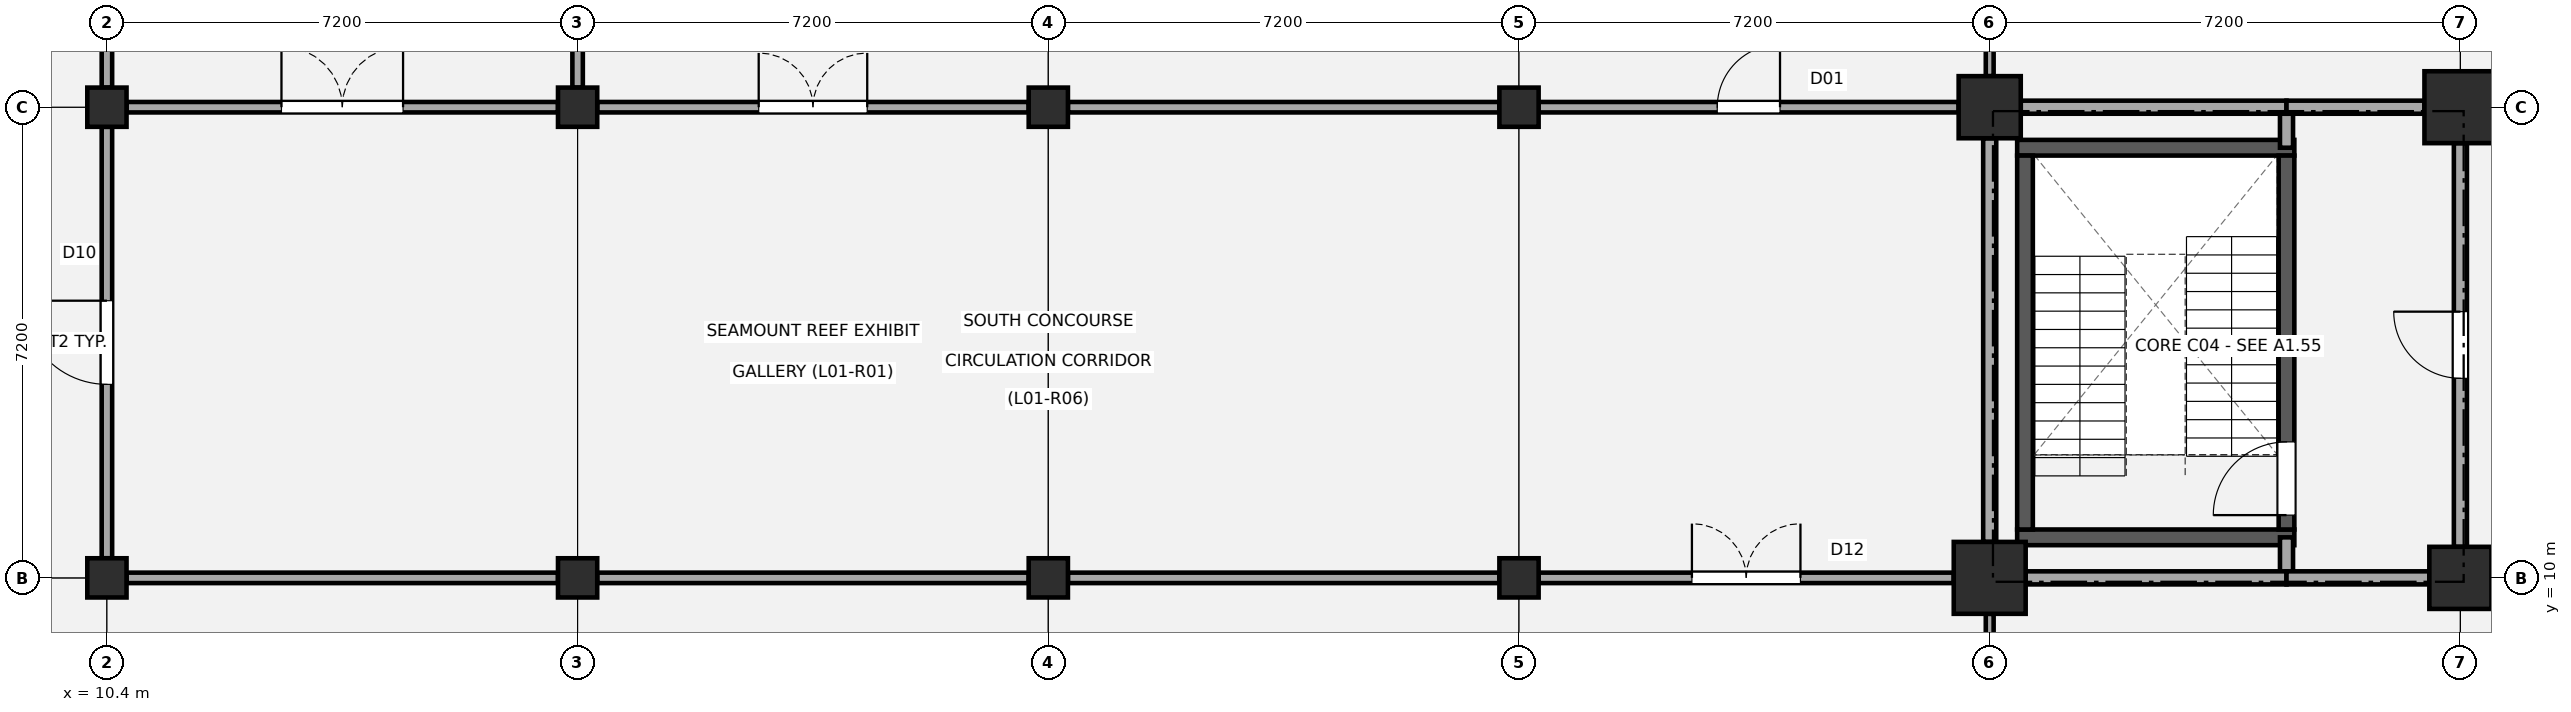
"""IFC4 building model, lengths in metres.
Left out: names, types, materials, properties, quantities, classifications, styles, units other than length and angle.
Written with IfcOpenShell. Run it as: python <this file> out.ifc"""

import sys

from ifc_helpers import new_model, si_unit, direction, frame, frame_2d, origin, origin_2d, place, context, subcontext, project, spatial, rectangle, extrude, element, fill, save


model = new_model("IFC4")
c1 = context("Model", 3, precision=1e-05, world=origin(), true_north=direction((0.0, 1.0)))
c2 = subcontext(c1, "Body", "Model", "MODEL_VIEW")
j1 = project(units=[si_unit("LENGTHUNIT", "METRE"), si_unit("PLANEANGLEUNIT", "RADIAN")], contexts=[c1])
p1 = place(None, origin())
s1 = spatial("IfcSite", under=j1, at=p1, CompositionType="ELEMENT")
p2 = place(p1, origin())
s2 = spatial("IfcBuilding", under=s1, at=p2, CompositionType="ELEMENT")
p3 = place(p2, frame((0.0, 0.0, 4.68)))
s3 = spatial("IfcBuildingStorey", under=s2, at=p3, CompositionType="ELEMENT", Elevation=4.68)
for number, where, z_axis, x_axis in (
    (1, (10.4, 10.0, 0.0), (0.0, 0.0, 1.0), (1.0, 0.0, 0.0)),
    (2, (10.4, 17.2, 0.0), (0.0, 0.0, 1.0), (1.0, 0.0, 0.0)),
    (3, (17.6, 10.0, 0.0), (0.0, 0.0, 1.0), (1.0, 0.0, 0.0)),
    (4, (17.6, 17.2, 0.0), (0.0, 0.0, 1.0), (1.0, 0.0, 0.0)),
    (5, (24.8, 10.0, 0.0), (0.0, 0.0, 1.0), (1.0, 0.0, 0.0)),
    (6, (24.8, 17.2, 0.0), (0.0, 0.0, 1.0), (1.0, 0.0, 0.0)),
    (7, (32.0, 10.0, 0.0), (0.0, 0.0, 1.0), (1.0, 0.0, 0.0)),
    (8, (32.0, 17.2, 0.0), (0.0, 0.0, 1.0), (1.0, 0.0, 0.0)),
):
    element("IfcColumn", number, at=place(p3, frame(where, z_axis=z_axis, x_axis=x_axis)), inside=s3, PredefinedType="COLUMN", context=c2, shape_type="SweptSolid", body=[
        extrude(rectangle(XDim=0.6, YDim=0.6, at=origin_2d()), origin(), (0.0, 0.0, 1.0), 4.5),
    ])
p4 = place(p3, frame((39.2, 10.0, 0.0), z_axis=(0.0, 0.0, 1.0), x_axis=(1.0, 0.0, 0.0)))
e9 = element("IfcColumn", 9, at=p4, inside=s3, PredefinedType="COLUMN", context=c2, shape_type="SweptSolid", body=[
    extrude(rectangle(XDim=1.1, YDim=1.1, at=origin_2d()), origin(), (0.0, 0.0, 1.0), 4.5),
])
for number, where, z_axis, x_axis in (
    (10, (39.2, 17.2, 0.0), (0.0, 0.0, 1.0), (1.0, 0.0, 0.0)),
    (11, (46.4, 10.0, 0.0), (0.0, 0.0, 1.0), (1.0, 0.0, 0.0)),
):
    element("IfcColumn", number, at=place(p3, frame(where, z_axis=z_axis, x_axis=x_axis)), inside=s3, PredefinedType="COLUMN", context=c2, shape_type="SweptSolid", body=[
        extrude(rectangle(XDim=0.95, YDim=0.95, at=origin_2d()), origin(), (0.0, 0.0, 1.0), 4.5),
    ])
p5 = place(p3, frame((46.4, 17.2, 0.0), z_axis=(0.0, 0.0, 1.0), x_axis=(1.0, 0.0, 0.0)))
e12 = element("IfcColumn", 12, at=p5, inside=s3, PredefinedType="COLUMN", context=c2, shape_type="SweptSolid", body=[
    extrude(rectangle(XDim=1.1, YDim=1.1, at=origin_2d()), origin(), (0.0, 0.0, 1.0), 4.5),
])
for number, where, z_axis, x_axis in (
    (13, (39.62, 10.62, 0.0), (0.0, 0.0, 1.0), (1.0, 0.0, 0.0)),
    (14, (39.62, 16.58, 0.0), (0.0, 0.0, 1.0), (1.0, 0.0, 0.0)),
):
    element("IfcWall", number, at=place(p3, frame(where, z_axis=z_axis, x_axis=x_axis)), inside=s3, PredefinedType="SHEAR", context=c2, shape_type="SweptSolid", body=[
        extrude(rectangle(XDim=4.24, YDim=0.24, at=frame_2d((2.12, 0.0))), origin(), (0.0, 0.0, 1.0), 4.2),
    ])
p6 = place(p3, frame((39.74, 10.74, 0.0), z_axis=(0.0, 0.0, 1.0), x_axis=(0.0, 1.0, 0.0)))
e15 = element("IfcWall", 15, at=p6, inside=s3, PredefinedType="SHEAR", context=c2, shape_type="SweptSolid", body=[
    extrude(rectangle(XDim=5.72, YDim=0.24, at=frame_2d((2.86, 0.0))), origin(), (0.0, 0.0, 1.0), 4.2),
])
p7 = place(p3, frame((43.74, 10.74, 0.0), z_axis=(0.0, 0.0, 1.0), x_axis=(0.0, 1.0, 0.0)))
e16 = element("IfcWall", 16, at=p7, inside=s3, PredefinedType="SHEAR", context=c2, shape_type="SweptSolid", body=[
    extrude(rectangle(XDim=5.72, YDim=0.24, at=frame_2d((2.86, 0.0))), origin(), (0.0, 0.0, 1.0), 4.2),
])
p8 = place(p7, frame((0.22, 0.0, 0.0)))
e17 = element("IfcOpeningElement", 17, at=p8, cuts=e16, PredefinedType="OPENING", context=c2, shape_type="SweptSolid", body=[
    extrude(rectangle(XDim=1.12, YDim=2.15, at=frame_2d((0.56, 1.075))), frame((0.0, 0.13, 0.0), z_axis=(0.0, -1.0, 0.0), x_axis=(1.0, 0.0, 0.0)), (0.0, 0.0, 1.0), 0.26),
])
p9 = place(p3, frame((43.74, 10.0, 0.0), z_axis=(0.0, 0.0, 1.0), x_axis=(0.0, 1.0, 0.0)))
e18 = element("IfcWall", 18, at=p9, inside=s3, PredefinedType="PARTITIONING", context=c2, shape_type="SweptSolid", body=[
    extrude(rectangle(XDim=0.62, YDim=0.2, at=frame_2d((0.31, 0.0))), origin(), (0.0, 0.0, 1.0), 3.54),
])
p10 = place(p3, frame((43.74, 16.58, 0.0), z_axis=(0.0, 0.0, 1.0), x_axis=(0.0, 1.0, 0.0)))
e19 = element("IfcWall", 19, at=p10, inside=s3, PredefinedType="PARTITIONING", context=c2, shape_type="SweptSolid", body=[
    extrude(rectangle(XDim=0.62, YDim=0.2, at=frame_2d((0.31, 0.0))), origin(), (0.0, 0.0, 1.0), 3.59),
])
p11 = place(p3, frame((39.2, 10.55, 0.0), z_axis=(0.0, 0.0, 1.0), x_axis=(0.0, 1.0, 0.0)))
e20 = element("IfcWall", 20, at=p11, inside=s3, PredefinedType="PARTITIONING", context=c2, shape_type="SweptSolid", body=[
    extrude(rectangle(XDim=6.175, YDim=0.2, at=frame_2d((3.087, 0.0))), origin(), (0.0, 0.0, 1.0), 3.59),
])
p12 = place(p3, frame((46.4, 10.475, 0.0), z_axis=(0.0, 0.0, 1.0), x_axis=(0.0, 1.0, 0.0)))
e21 = element("IfcWall", 21, at=p12, inside=s3, PredefinedType="PARTITIONING", context=c2, shape_type="SweptSolid", body=[
    extrude(rectangle(XDim=6.175, YDim=0.2, at=frame_2d((3.087, 0.0))), origin(), (0.0, 0.0, 1.0), 3.59),
])
p13 = place(p12, frame((2.577, 0.0, 0.0)))
e22 = element("IfcOpeningElement", 22, at=p13, cuts=e21, PredefinedType="OPENING", context=c2, shape_type="SweptSolid", body=[
    extrude(rectangle(XDim=1.02, YDim=2.15, at=frame_2d((0.51, 1.075))), frame((0.0, 0.11, 0.0), z_axis=(0.0, -1.0, 0.0), x_axis=(1.0, 0.0, 0.0)), (0.0, 0.0, 1.0), 0.22),
])
p14 = place(p3, frame((39.75, 10.0, 0.0), z_axis=(0.0, 0.0, 1.0), x_axis=(1.0, 0.0, 0.0)))
e23 = element("IfcWall", 23, at=p14, inside=s3, PredefinedType="PARTITIONING", context=c2, shape_type="SweptSolid", body=[
    extrude(rectangle(XDim=3.99, YDim=0.2, at=frame_2d((1.995, 0.0))), origin(), (0.0, 0.0, 1.0), 3.54),
])
p15 = place(p3, frame((43.74, 10.0, 0.0), z_axis=(0.0, 0.0, 1.0), x_axis=(1.0, 0.0, 0.0)))
e24 = element("IfcWall", 24, at=p15, inside=s3, PredefinedType="PARTITIONING", context=c2, shape_type="SweptSolid", body=[
    extrude(rectangle(XDim=2.185, YDim=0.2, at=frame_2d((1.093, 0.0))), origin(), (0.0, 0.0, 1.0), 3.54),
])
p16 = place(p3, frame((39.675, 17.2, 0.0), z_axis=(0.0, 0.0, 1.0), x_axis=(1.0, 0.0, 0.0)))
e25 = element("IfcWall", 25, at=p16, inside=s3, PredefinedType="PARTITIONING", context=c2, shape_type="SweptSolid", body=[
    extrude(rectangle(XDim=4.065, YDim=0.2, at=frame_2d((2.032, 0.0))), origin(), (0.0, 0.0, 1.0), 3.59),
])
p17 = place(p3, frame((43.74, 17.2, 0.0), z_axis=(0.0, 0.0, 1.0), x_axis=(1.0, 0.0, 0.0)))
e26 = element("IfcWall", 26, at=p17, inside=s3, PredefinedType="PARTITIONING", context=c2, shape_type="SweptSolid", body=[
    extrude(rectangle(XDim=2.11, YDim=0.2, at=frame_2d((1.055, 0.0))), origin(), (0.0, 0.0, 1.0), 3.59),
])
p18 = place(p3, frame((10.4, 10.3, 0.0), z_axis=(0.0, 0.0, 1.0), x_axis=(0.0, 1.0, 0.0)))
e27 = element("IfcWall", 27, at=p18, inside=s3, PredefinedType="PARTITIONING", context=c2, shape_type="SweptSolid", body=[
    extrude(rectangle(XDim=6.6, YDim=0.16, at=frame_2d((3.3, 0.0))), origin(), (0.0, 0.0, 1.0), 3.65),
])
p19 = place(p18, frame((2.66, 0.0, 0.0)))
e28 = element("IfcOpeningElement", 28, at=p19, cuts=e27, PredefinedType="OPENING", context=c2, shape_type="SweptSolid", body=[
    extrude(rectangle(XDim=1.28, YDim=2.2, at=frame_2d((0.64, 1.1))), frame((0.0, 0.09, 0.0), z_axis=(0.0, -1.0, 0.0), x_axis=(1.0, 0.0, 0.0)), (0.0, 0.0, 1.0), 0.18),
])
p20 = place(p3, frame((10.4, 17.5, 0.0), z_axis=(0.0, 0.0, 1.0), x_axis=(0.0, 1.0, 0.0)))
e29 = element("IfcWall", 29, at=p20, inside=s3, PredefinedType="PARTITIONING", context=c2, shape_type="SweptSolid", body=[
    extrude(rectangle(XDim=6.35, YDim=0.16, at=frame_2d((3.175, 0.0))), origin(), (0.0, 0.0, 1.0), 3.6),
])
p21 = place(p20, frame((2.245, 0.0, 0.0)))
e30 = element("IfcOpeningElement", 30, at=p21, cuts=e29, PredefinedType="OPENING", context=c2, shape_type="SweptSolid", body=[
    extrude(rectangle(XDim=1.86, YDim=2.26, at=frame_2d((0.93, 1.13))), frame((0.0, 0.09, 0.0), z_axis=(0.0, -1.0, 0.0), x_axis=(1.0, 0.0, 0.0)), (0.0, 0.0, 1.0), 0.18),
])
p22 = place(p3, frame((10.7, 10.0, 0.0), z_axis=(0.0, 0.0, 1.0), x_axis=(1.0, 0.0, 0.0)))
e31 = element("IfcWall", 31, at=p22, inside=s3, PredefinedType="PARTITIONING", context=c2, shape_type="SweptSolid", body=[
    extrude(rectangle(XDim=6.6, YDim=0.16, at=frame_2d((3.3, 0.0))), origin(), (0.0, 0.0, 1.0), 3.6),
])
p23 = place(p3, frame((10.7, 17.2, 0.0), z_axis=(0.0, 0.0, 1.0), x_axis=(1.0, 0.0, 0.0)))
e32 = element("IfcWall", 32, at=p23, inside=s3, PredefinedType="PARTITIONING", context=c2, shape_type="SweptSolid", body=[
    extrude(rectangle(XDim=6.6, YDim=0.16, at=frame_2d((3.3, 0.0))), origin(), (0.0, 0.0, 1.0), 3.65),
])
p24 = place(p23, frame((2.37, 0.0, 0.0)))
e33 = element("IfcOpeningElement", 33, at=p24, cuts=e32, PredefinedType="OPENING", context=c2, shape_type="SweptSolid", body=[
    extrude(rectangle(XDim=1.86, YDim=2.26, at=frame_2d((0.93, 1.13))), frame((0.0, 0.09, 0.0), z_axis=(0.0, -1.0, 0.0), x_axis=(1.0, 0.0, 0.0)), (0.0, 0.0, 1.0), 0.18),
])
p25 = place(p3, frame((17.6, 17.5, 0.0), z_axis=(0.0, 0.0, 1.0), x_axis=(0.0, 1.0, 0.0)))
e34 = element("IfcWall", 34, at=p25, inside=s3, PredefinedType="PARTITIONING", context=c2, shape_type="SweptSolid", body=[
    extrude(rectangle(XDim=6.425, YDim=0.16, at=frame_2d((3.212, 0.0))), origin(), (0.0, 0.0, 1.0), 3.6),
])
p26 = place(p25, frame((2.183, 0.0, 0.0)))
e35 = element("IfcOpeningElement", 35, at=p26, cuts=e34, PredefinedType="OPENING", context=c2, shape_type="SweptSolid", body=[
    extrude(rectangle(XDim=2.06, YDim=2.28, at=frame_2d((1.03, 1.14))), frame((0.0, 0.09, 0.0), z_axis=(0.0, -1.0, 0.0), x_axis=(1.0, 0.0, 0.0)), (0.0, 0.0, 1.0), 0.18),
])
p27 = place(p3, frame((17.9, 10.0, 0.0), z_axis=(0.0, 0.0, 1.0), x_axis=(1.0, 0.0, 0.0)))
e36 = element("IfcWall", 36, at=p27, inside=s3, PredefinedType="PARTITIONING", context=c2, shape_type="SweptSolid", body=[
    extrude(rectangle(XDim=6.6, YDim=0.16, at=frame_2d((3.3, 0.0))), origin(), (0.0, 0.0, 1.0), 3.65),
])
p28 = place(p3, frame((17.9, 17.2, 0.0), z_axis=(0.0, 0.0, 1.0), x_axis=(1.0, 0.0, 0.0)))
e37 = element("IfcWall", 37, at=p28, inside=s3, PredefinedType="PARTITIONING", context=c2, shape_type="SweptSolid", body=[
    extrude(rectangle(XDim=6.6, YDim=0.16, at=frame_2d((3.3, 0.0))), origin(), (0.0, 0.0, 1.0), 3.6),
])
p29 = place(p28, frame((2.47, 0.0, 0.0)))
e38 = element("IfcOpeningElement", 38, at=p29, cuts=e37, PredefinedType="OPENING", context=c2, shape_type="SweptSolid", body=[
    extrude(rectangle(XDim=1.66, YDim=2.22, at=frame_2d((0.83, 1.11))), frame((0.0, 0.09, 0.0), z_axis=(0.0, -1.0, 0.0), x_axis=(1.0, 0.0, 0.0)), (0.0, 0.0, 1.0), 0.18),
])
p30 = place(p3, frame((25.1, 10.0, 0.0), z_axis=(0.0, 0.0, 1.0), x_axis=(1.0, 0.0, 0.0)))
e39 = element("IfcWall", 39, at=p30, inside=s3, PredefinedType="PARTITIONING", context=c2, shape_type="SweptSolid", body=[
    extrude(rectangle(XDim=6.6, YDim=0.16, at=frame_2d((3.3, 0.0))), origin(), (0.0, 0.0, 1.0), 3.6),
])
p31 = place(p3, frame((25.1, 17.2, 0.0), z_axis=(0.0, 0.0, 1.0), x_axis=(1.0, 0.0, 0.0)))
e40 = element("IfcWall", 40, at=p31, inside=s3, PredefinedType="PARTITIONING", context=c2, shape_type="SweptSolid", body=[
    extrude(rectangle(XDim=6.6, YDim=0.16, at=frame_2d((3.3, 0.0))), origin(), (0.0, 0.0, 1.0), 3.65),
])
p32 = place(p3, frame((39.2, 3.275, 0.0), z_axis=(0.0, 0.0, 1.0), x_axis=(0.0, 1.0, 0.0)))
e41 = element("IfcWall", 41, at=p32, inside=s3, PredefinedType="PARTITIONING", context=c2, shape_type="SweptSolid", body=[
    extrude(rectangle(XDim=6.175, YDim=0.12, at=frame_2d((3.087, 0.0))), origin(), (0.0, 0.0, 1.0), 3.56),
])
p33 = place(p32, frame((2.367, 0.0, 0.0)))
e42 = element("IfcOpeningElement", 42, at=p33, cuts=e41, PredefinedType="OPENING", context=c2, shape_type="SweptSolid", body=[
    extrude(rectangle(XDim=1.44, YDim=2.2, at=frame_2d((0.72, 1.1))), frame((0.0, 0.07, 0.0), z_axis=(0.0, -1.0, 0.0), x_axis=(1.0, 0.0, 0.0)), (0.0, 0.0, 1.0), 0.14),
])
p34 = place(p3, frame((32.3, 10.0, 0.0), z_axis=(0.0, 0.0, 1.0), x_axis=(1.0, 0.0, 0.0)))
e43 = element("IfcWall", 43, at=p34, inside=s3, PredefinedType="PARTITIONING", context=c2, shape_type="SweptSolid", body=[
    extrude(rectangle(XDim=6.35, YDim=0.16, at=frame_2d((3.175, 0.0))), origin(), (0.0, 0.0, 1.0), 3.65),
])
p35 = place(p34, frame((2.345, 0.0, 0.0)))
e44 = element("IfcOpeningElement", 44, at=p35, cuts=e43, PredefinedType="OPENING", context=c2, shape_type="SweptSolid", body=[
    extrude(rectangle(XDim=1.66, YDim=2.22, at=frame_2d((0.83, 1.11))), frame((0.0, 0.09, 0.0), z_axis=(0.0, -1.0, 0.0), x_axis=(1.0, 0.0, 0.0)), (0.0, 0.0, 1.0), 0.18),
])
p36 = place(p3, frame((32.3, 17.2, 0.0), z_axis=(0.0, 0.0, 1.0), x_axis=(1.0, 0.0, 0.0)))
e45 = element("IfcWall", 45, at=p36, inside=s3, PredefinedType="PARTITIONING", context=c2, shape_type="SweptSolid", body=[
    extrude(rectangle(XDim=6.425, YDim=0.16, at=frame_2d((3.212, 0.0))), origin(), (0.0, 0.0, 1.0), 3.6),
])
p37 = place(p36, frame((2.732, 0.0, 0.0)))
e46 = element("IfcOpeningElement", 46, at=p37, cuts=e45, PredefinedType="OPENING", context=c2, shape_type="SweptSolid", body=[
    extrude(rectangle(XDim=0.96, YDim=2.1, at=frame_2d((0.48, 1.05))), frame((0.0, 0.09, 0.0), z_axis=(0.0, -1.0, 0.0), x_axis=(1.0, 0.0, 0.0)), (0.0, 0.0, 1.0), 0.18),
])
p38 = place(p3, frame((39.2, 17.675, 0.0), z_axis=(0.0, 0.0, 1.0), x_axis=(0.0, 1.0, 0.0)))
e47 = element("IfcWall", 47, at=p38, inside=s3, PredefinedType="PARTITIONING", context=c2, shape_type="SweptSolid", body=[
    extrude(rectangle(XDim=6.175, YDim=0.12, at=frame_2d((3.087, 0.0))), origin(), (0.0, 0.0, 1.0), 3.56),
])
p39 = place(p38, frame((2.548, 0.0, 0.0)))
e48 = element("IfcOpeningElement", 48, at=p39, cuts=e47, PredefinedType="OPENING", context=c2, shape_type="SweptSolid", body=[
    extrude(rectangle(XDim=1.08, YDim=2.16, at=frame_2d((0.54, 1.08))), frame((0.0, 0.07, 0.0), z_axis=(0.0, -1.0, 0.0), x_axis=(1.0, 0.0, 0.0)), (0.0, 0.0, 1.0), 0.14),
])
p40 = place(p8, origin())
e49 = element("IfcDoor", 49, at=p40, inside=s3, OperationType="SINGLE_SWING_LEFT", PredefinedType="DOOR", context=c2, shape_type="SweptSolid", body=[
    extrude(rectangle(XDim=1.12, YDim=2.15, at=frame_2d((0.56, 1.075))), frame((0.0, 0.025, 0.0), z_axis=(0.0, -1.0, 0.0), x_axis=(1.0, 0.0, 0.0)), (0.0, 0.0, 1.0), 0.05),
])
fill(e17, e49)
p41 = place(p13, origin())
e50 = element("IfcDoor", 50, at=p41, inside=s3, OperationType="SINGLE_SWING_RIGHT", PredefinedType="DOOR", context=c2, shape_type="SweptSolid", body=[
    extrude(rectangle(XDim=1.02, YDim=2.15, at=frame_2d((0.51, 1.075))), frame((0.0, 0.025, 0.0), z_axis=(0.0, -1.0, 0.0), x_axis=(1.0, 0.0, 0.0)), (0.0, 0.0, 1.0), 0.05),
])
fill(e22, e50)
p42 = place(p19, origin())
e51 = element("IfcDoor", 51, at=p42, inside=s3, OperationType="SINGLE_SWING_RIGHT", PredefinedType="DOOR", context=c2, shape_type="SweptSolid", body=[
    extrude(rectangle(XDim=1.28, YDim=2.2, at=frame_2d((0.64, 1.1))), frame((0.0, 0.025, 0.0), z_axis=(0.0, -1.0, 0.0), x_axis=(1.0, 0.0, 0.0)), (0.0, 0.0, 1.0), 0.05),
])
fill(e28, e51)
p43 = place(p35, origin())
e52 = element("IfcDoor", 52, at=p43, inside=s3, OperationType="DOUBLE_DOOR_SINGLE_SWING", PredefinedType="DOOR", context=c2, shape_type="SweptSolid", body=[
    extrude(rectangle(XDim=1.66, YDim=2.22, at=frame_2d((0.83, 1.11))), frame((0.0, 0.025, 0.0), z_axis=(0.0, -1.0, 0.0), x_axis=(1.0, 0.0, 0.0)), (0.0, 0.0, 1.0), 0.05),
])
fill(e44, e52)
p44 = place(p24, origin())
e53 = element("IfcDoor", 53, at=p44, inside=s3, OperationType="DOUBLE_DOOR_SINGLE_SWING", PredefinedType="DOOR", context=c2, shape_type="SweptSolid", body=[
    extrude(rectangle(XDim=1.86, YDim=2.26, at=frame_2d((0.93, 1.13))), frame((0.0, 0.025, 0.0), z_axis=(0.0, -1.0, 0.0), x_axis=(1.0, 0.0, 0.0)), (0.0, 0.0, 1.0), 0.05),
])
fill(e33, e53)
p45 = place(p29, origin())
e54 = element("IfcDoor", 54, at=p45, inside=s3, OperationType="DOUBLE_DOOR_SINGLE_SWING", PredefinedType="DOOR", context=c2, shape_type="SweptSolid", body=[
    extrude(rectangle(XDim=1.66, YDim=2.22, at=frame_2d((0.83, 1.11))), frame((0.0, 0.025, 0.0), z_axis=(0.0, -1.0, 0.0), x_axis=(1.0, 0.0, 0.0)), (0.0, 0.0, 1.0), 0.05),
])
fill(e38, e54)
p46 = place(p37, origin())
e55 = element("IfcDoor", 55, at=p46, inside=s3, OperationType="SINGLE_SWING_RIGHT", PredefinedType="DOOR", context=c2, shape_type="SweptSolid", body=[
    extrude(rectangle(XDim=0.96, YDim=2.1, at=frame_2d((0.48, 1.05))), frame((0.0, 0.025, 0.0), z_axis=(0.0, -1.0, 0.0), x_axis=(1.0, 0.0, 0.0)), (0.0, 0.0, 1.0), 0.05),
])
fill(e46, e55)
save(model, sys.argv[1])
